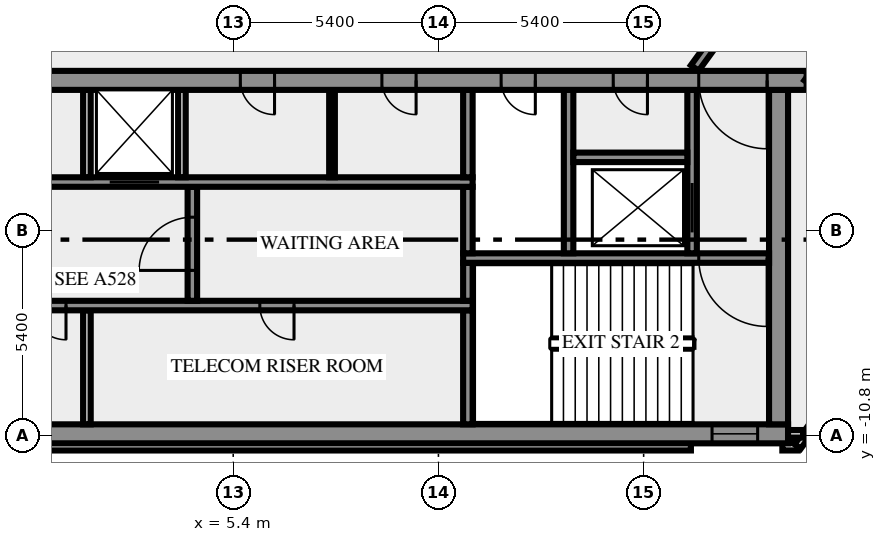
"""IFC4 building model, lengths in metres.
Left out: names, types, materials, properties, quantities, classifications, styles, units other than length and angle.
Written with IfcOpenShell. Run it as: python <this file> out.ifc"""

import sys

from ifc_helpers import new_model, si_unit, direction, frame, frame_2d, origin, place, context, subcontext, project, spatial, rectangle, extrude, element, fill, save


model = new_model("IFC4")
c1 = context("Model", 3, precision=1e-05, world=origin(), true_north=direction((0.0, 1.0)))
c2 = subcontext(c1, "Body", "Model", "MODEL_VIEW")
j1 = project(units=[si_unit("LENGTHUNIT", "METRE"), si_unit("PLANEANGLEUNIT", "RADIAN")], contexts=[c1])
p1 = place(None, origin())
s1 = spatial("IfcSite", under=j1, at=p1, CompositionType="ELEMENT")
p2 = place(p1, origin())
s2 = spatial("IfcBuilding", under=s1, at=p2, CompositionType="ELEMENT")
p3 = place(p2, frame((0.0, 0.0, 351.0)))
s3 = spatial("IfcBuildingStorey", under=s2, at=p3, CompositionType="ELEMENT", Elevation=351.0)
p4 = place(p3, frame((-17.444, -11.088, 0.0), z_axis=(0.0, 0.0, 1.0), x_axis=(1.0, 0.0, 0.0)))
e1 = element("IfcWall", 1, at=p4, inside=s3, PredefinedType="SOLIDWALL", context=c2, shape_type="SweptSolid", body=[
    extrude(rectangle(XDim=34.888, YDim=0.2, at=frame_2d((17.444, 0.0))), origin(), (0.0, 0.0, 1.0), 3.2),
])
p5 = place(p3, frame((19.85, -11.088, 0.0), z_axis=(0.0, 0.0, 1.0), x_axis=(1.0, 0.0, 0.0)))
e2 = element("IfcWall", 2, at=p5, inside=s3, PredefinedType="SOLIDWALL", context=c2, shape_type="SweptSolid", body=[
    extrude(rectangle(XDim=0.406, YDim=0.2, at=frame_2d((0.203, 0.0))), origin(), (0.0, 0.0, 1.0), 3.2),
])
p6 = place(p3, frame((20.253, -11.083, 0.0), z_axis=(0.0, 0.0, 1.0), x_axis=(0.587766567315, 0.809030569476, 0.0)))
e3 = element("IfcWall", 3, at=p6, inside=s3, PredefinedType="SOLIDWALL", context=c2, shape_type="SweptSolid", body=[
    extrude(rectangle(XDim=2.688, YDim=0.2, at=frame_2d((1.344, 0.0))), origin(), (0.0, 0.0, 1.0), 3.2),
])
p7 = place(p3, frame((19.98, -10.75, 0.0), z_axis=(0.0, 0.0, 1.0), x_axis=(1.0, 0.0, 0.0)))
e4 = element("IfcWall", 4, at=p7, inside=s3, PredefinedType="SOLIDWALL", context=c2, shape_type="SweptSolid", body=[
    extrude(rectangle(XDim=0.417, YDim=0.2, at=frame_2d((0.208, 0.0))), origin(), (0.0, 0.0, 1.0), 3.2),
])
p8 = place(p3, frame((-20.0, -10.75, 0.0), z_axis=(0.0, 0.0, 1.0), x_axis=(1.0, 0.0, 0.0)))
e5 = element("IfcWall", 5, at=p8, inside=s3, PredefinedType="SHEAR", context=c2, shape_type="SweptSolid", body=[
    extrude(rectangle(XDim=40.0, YDim=0.5, at=frame_2d((20.0, 0.0))), origin(), (0.0, 0.0, 1.0), 3.2),
])
p9 = place(p8, frame((0.8, 0.0, 1.0)))
e6 = element("IfcOpeningElement", 6, at=p9, cuts=e5, PredefinedType="OPENING", context=c2, shape_type="SweptSolid", body=[
    extrude(rectangle(XDim=1.2, YDim=1.2, at=frame_2d((0.6, 0.6))), frame((0.0, 0.26, 0.0), z_axis=(0.0, -1.0, 0.0), x_axis=(1.0, 0.0, 0.0)), (0.0, 0.0, 1.0), 0.52),
])
p10 = place(p8, frame((38.0, 0.0, 1.0)))
e7 = element("IfcOpeningElement", 7, at=p10, cuts=e5, PredefinedType="OPENING", context=c2, shape_type="SweptSolid", body=[
    extrude(rectangle(XDim=1.2, YDim=1.2, at=frame_2d((0.6, 0.6))), frame((0.0, 0.26, 0.0), z_axis=(0.0, -1.0, 0.0), x_axis=(1.0, 0.0, 0.0)), (0.0, 0.0, 1.0), 0.52),
])
p11 = place(p3, frame((1.55, -10.5, 0.0), z_axis=(0.0, 0.0, 1.0), x_axis=(0.0, 1.0, 0.0)))
e8 = element("IfcWall", 8, at=p11, inside=s3, PredefinedType="SOLIDWALL", context=c2, shape_type="SweptSolid", body=[
    extrude(rectangle(XDim=3.0, YDim=0.2, at=frame_2d((1.5, 0.0))), origin(), (0.0, 0.0, 1.0), 3.2),
])
p12 = place(p3, frame((11.575, -10.5, 0.0), z_axis=(0.0, 0.0, 1.0), x_axis=(0.0, 1.0, 0.0)))
e9 = element("IfcWall", 9, at=p12, inside=s3, PredefinedType="SHEAR", context=c2, shape_type="SweptSolid", body=[
    extrude(rectangle(XDim=3.0, YDim=0.25, at=frame_2d((1.5, 0.0))), origin(), (0.0, 0.0, 1.0), 3.2),
])
p13 = place(p3, frame((19.75, -10.5, 0.0), z_axis=(0.0, 0.0, 1.0), x_axis=(0.0, 1.0, 0.0)))
e10 = element("IfcWall", 10, at=p13, inside=s3, PredefinedType="SHEAR", context=c2, shape_type="SweptSolid", body=[
    extrude(rectangle(XDim=8.8, YDim=0.5, at=frame_2d((4.4, 0.0))), origin(), (0.0, 0.0, 1.0), 3.2),
])
p14 = place(p3, frame((11.7, -7.375, 0.0), z_axis=(0.0, 0.0, 1.0), x_axis=(-1.0, 0.0, 0.0)))
e11 = element("IfcWall", 11, at=p14, inside=s3, PredefinedType="SHEAR", context=c2, shape_type="SweptSolid", body=[
    extrude(rectangle(XDim=23.4, YDim=0.25, at=frame_2d((11.7, 0.0))), origin(), (0.0, 0.0, 1.0), 3.2),
])
p15 = place(p14, frame((22.225, 0.0, 0.0)))
e12 = element("IfcOpeningElement", 12, at=p15, cuts=e11, PredefinedType="OPENING", context=c2, shape_type="SweptSolid", body=[
    extrude(rectangle(XDim=0.8, YDim=2.1, at=frame_2d((0.4, 1.05))), frame((0.0, 0.135, 0.0), z_axis=(0.0, -1.0, 0.0), x_axis=(1.0, 0.0, 0.0)), (0.0, 0.0, 1.0), 0.27),
])
p16 = place(p14, frame((20.2, 0.0, 0.0)))
e13 = element("IfcOpeningElement", 13, at=p16, cuts=e11, PredefinedType="OPENING", context=c2, shape_type="SweptSolid", body=[
    extrude(rectangle(XDim=1.1, YDim=2.1, at=frame_2d((0.55, 1.05))), frame((0.0, 0.135, 0.0), z_axis=(0.0, -1.0, 0.0), x_axis=(1.0, 0.0, 0.0)), (0.0, 0.0, 1.0), 0.27),
])
p17 = place(p14, frame((17.7, 0.0, 0.0)))
e14 = element("IfcOpeningElement", 14, at=p17, cuts=e11, PredefinedType="OPENING", context=c2, shape_type="SweptSolid", body=[
    extrude(rectangle(XDim=1.1, YDim=2.1, at=frame_2d((0.55, 1.05))), frame((0.0, 0.135, 0.0), z_axis=(0.0, -1.0, 0.0), x_axis=(1.0, 0.0, 0.0)), (0.0, 0.0, 1.0), 0.27),
])
p18 = place(p14, frame((15.975, 0.0, 0.0)))
e15 = element("IfcOpeningElement", 15, at=p18, cuts=e11, PredefinedType="OPENING", context=c2, shape_type="SweptSolid", body=[
    extrude(rectangle(XDim=0.8, YDim=2.1, at=frame_2d((0.4, 1.05))), frame((0.0, 0.135, 0.0), z_axis=(0.0, -1.0, 0.0), x_axis=(1.0, 0.0, 0.0)), (0.0, 0.0, 1.0), 0.27),
])
p19 = place(p14, frame((14.65, 0.0, 0.0)))
e16 = element("IfcOpeningElement", 16, at=p19, cuts=e11, PredefinedType="OPENING", context=c2, shape_type="SweptSolid", body=[
    extrude(rectangle(XDim=0.8, YDim=2.1, at=frame_2d((0.4, 1.05))), frame((0.0, 0.135, 0.0), z_axis=(0.0, -1.0, 0.0), x_axis=(1.0, 0.0, 0.0)), (0.0, 0.0, 1.0), 0.27),
])
p20 = place(p14, frame((12.8, 0.0, 0.0)))
e17 = element("IfcOpeningElement", 17, at=p20, cuts=e11, PredefinedType="OPENING", context=c2, shape_type="SweptSolid", body=[
    extrude(rectangle(XDim=0.9, YDim=2.1, at=frame_2d((0.45, 1.05))), frame((0.0, 0.135, 0.0), z_axis=(0.0, -1.0, 0.0), x_axis=(1.0, 0.0, 0.0)), (0.0, 0.0, 1.0), 0.27),
])
p21 = place(p14, frame((10.7, 0.0, 0.0)))
e18 = element("IfcOpeningElement", 18, at=p21, cuts=e11, PredefinedType="OPENING", context=c2, shape_type="SweptSolid", body=[
    extrude(rectangle(XDim=0.9, YDim=2.1, at=frame_2d((0.45, 1.05))), frame((0.0, 0.135, 0.0), z_axis=(0.0, -1.0, 0.0), x_axis=(1.0, 0.0, 0.0)), (0.0, 0.0, 1.0), 0.27),
])
p22 = place(p14, frame((4.7, 0.0, 0.0)))
e19 = element("IfcOpeningElement", 19, at=p22, cuts=e11, PredefinedType="OPENING", context=c2, shape_type="SweptSolid", body=[
    extrude(rectangle(XDim=0.9, YDim=2.1, at=frame_2d((0.45, 1.05))), frame((0.0, 0.135, 0.0), z_axis=(0.0, -1.0, 0.0), x_axis=(1.0, 0.0, 0.0)), (0.0, 0.0, 1.0), 0.27),
])
p23 = place(p3, frame((4.325, -7.25, 0.0), z_axis=(0.0, 0.0, 1.0), x_axis=(0.0, 1.0, 0.0)))
e20 = element("IfcWall", 20, at=p23, inside=s3, PredefinedType="SHEAR", context=c2, shape_type="SweptSolid", body=[
    extrude(rectangle(XDim=3.0, YDim=0.25, at=frame_2d((1.5, 0.0))), origin(), (0.0, 0.0, 1.0), 3.2),
])
p24 = place(p23, frame((0.8, 0.0, 0.0)))
e21 = element("IfcOpeningElement", 21, at=p24, cuts=e20, PredefinedType="OPENING", context=c2, shape_type="SweptSolid", body=[
    extrude(rectangle(XDim=1.4, YDim=2.1, at=frame_2d((0.7, 1.05))), frame((0.0, 0.135, 0.0), z_axis=(0.0, -1.0, 0.0), x_axis=(1.0, 0.0, 0.0)), (0.0, 0.0, 1.0), 0.27),
])
p25 = place(p3, frame((11.575, -7.25, 0.0), z_axis=(0.0, 0.0, 1.0), x_axis=(0.0, 1.0, 0.0)))
e22 = element("IfcWall", 22, at=p25, inside=s3, PredefinedType="SHEAR", context=c2, shape_type="SweptSolid", body=[
    extrude(rectangle(XDim=1.0, YDim=0.25, at=frame_2d((0.5, 0.0))), origin(), (0.0, 0.0, 1.0), 3.2),
])
p26 = place(p3, frame((19.5, -6.125, 0.0), z_axis=(0.0, 0.0, 1.0), x_axis=(-1.0, 0.0, 0.0)))
e23 = element("IfcWall", 23, at=p26, inside=s3, PredefinedType="SHEAR", context=c2, shape_type="SweptSolid", body=[
    extrude(rectangle(XDim=8.05, YDim=0.25, at=frame_2d((4.025, 0.0))), origin(), (0.0, 0.0, 1.0), 3.2),
])
p27 = place(p26, frame((0.05, 0.0, 0.0)))
e24 = element("IfcOpeningElement", 24, at=p27, cuts=e23, PredefinedType="OPENING", context=c2, shape_type="SweptSolid", body=[
    extrude(rectangle(XDim=1.8, YDim=2.1, at=frame_2d((0.9, 1.05))), frame((0.0, 0.135, 0.0), z_axis=(0.0, -1.0, 0.0), x_axis=(1.0, 0.0, 0.0)), (0.0, 0.0, 1.0), 0.27),
])
p28 = place(p3, frame((11.575, -6.0, 0.0), z_axis=(0.0, 0.0, 1.0), x_axis=(0.0, 1.0, 0.0)))
e25 = element("IfcWall", 25, at=p28, inside=s3, PredefinedType="SHEAR", context=c2, shape_type="SweptSolid", body=[
    extrude(rectangle(XDim=1.75, YDim=0.25, at=frame_2d((0.875, 0.0))), origin(), (0.0, 0.0, 1.0), 3.2),
])
p29 = place(p3, frame((14.225, -6.0, 0.0), z_axis=(0.0, 0.0, 1.0), x_axis=(0.0, 1.0, 0.0)))
e26 = element("IfcWall", 26, at=p29, inside=s3, PredefinedType="SHEAR", context=c2, shape_type="SweptSolid", body=[
    extrude(rectangle(XDim=4.3, YDim=0.25, at=frame_2d((2.15, 0.0))), origin(), (0.0, 0.0, 1.0), 3.2),
])
p30 = place(p3, frame((17.475, -6.0, 0.0), z_axis=(0.0, 0.0, 1.0), x_axis=(0.0, 1.0, 0.0)))
e27 = element("IfcWall", 27, at=p30, inside=s3, PredefinedType="SHEAR", context=c2, shape_type="SweptSolid", body=[
    extrude(rectangle(XDim=4.3, YDim=0.25, at=frame_2d((2.15, 0.0))), origin(), (0.0, 0.0, 1.0), 3.2),
])
p31 = place(p30, frame((0.55, 0.0, 0.0)))
e28 = element("IfcOpeningElement", 28, at=p31, cuts=e27, PredefinedType="OPENING", context=c2, shape_type="SweptSolid", body=[
    extrude(rectangle(XDim=1.3, YDim=2.1, at=frame_2d((0.65, 1.05))), frame((0.0, 0.135, 0.0), z_axis=(0.0, -1.0, 0.0), x_axis=(1.0, 0.0, 0.0)), (0.0, 0.0, 1.0), 0.27),
])
p32 = place(p3, frame((-0.6, -4.125, 0.0), z_axis=(0.0, 0.0, 1.0), x_axis=(1.0, 0.0, 0.0)))
e29 = element("IfcWall", 29, at=p32, inside=s3, PredefinedType="SHEAR", context=c2, shape_type="SweptSolid", body=[
    extrude(rectangle(XDim=12.3, YDim=0.25, at=frame_2d((6.15, 0.0))), origin(), (0.0, 0.0, 1.0), 3.2),
])
p33 = place(p32, frame((2.75, 0.0, 0.0)))
e30 = element("IfcOpeningElement", 30, at=p33, cuts=e29, PredefinedType="OPENING", context=c2, shape_type="SweptSolid", body=[
    extrude(rectangle(XDim=1.3, YDim=2.1, at=frame_2d((0.65, 1.05))), frame((0.0, 0.135, 0.0), z_axis=(0.0, -1.0, 0.0), x_axis=(1.0, 0.0, 0.0)), (0.0, 0.0, 1.0), 0.27),
])
for number, where, z_axis, x_axis in (
    (31, (1.55, -4.0, 0.0), (0.0, 0.0, 1.0), (0.0, 1.0, 0.0)),
    (32, (4.05, -4.0, 0.0), (0.0, 0.0, 1.0), (0.0, 1.0, 0.0)),
):
    element("IfcWall", number, at=place(p3, frame(where, z_axis=z_axis, x_axis=x_axis)), inside=s3, PredefinedType="SOLIDWALL", context=c2, shape_type="SweptSolid", body=[
        extrude(rectangle(XDim=2.3, YDim=0.2, at=frame_2d((1.15, 0.0))), origin(), (0.0, 0.0, 1.0), 3.2),
    ])
p34 = place(p3, frame((8.0, -4.0, 0.0), z_axis=(0.0, 0.0, 1.0), x_axis=(0.0, 1.0, 0.0)))
e33 = element("IfcWall", 33, at=p34, inside=s3, PredefinedType="PARTITIONING", context=c2, shape_type="SweptSolid", body=[
    extrude(rectangle(XDim=2.3, YDim=0.15, at=frame_2d((1.15, 0.0))), origin(), (0.0, 0.0, 1.0), 3.2),
])
p35 = place(p3, frame((11.575, -4.0, 0.0), z_axis=(0.0, 0.0, 1.0), x_axis=(0.0, 1.0, 0.0)))
e34 = element("IfcWall", 34, at=p35, inside=s3, PredefinedType="SHEAR", context=c2, shape_type="SweptSolid", body=[
    extrude(rectangle(XDim=2.3, YDim=0.25, at=frame_2d((1.15, 0.0))), origin(), (0.0, 0.0, 1.0), 3.2),
])
p36 = place(p3, frame((14.35, -3.475, 0.0), z_axis=(0.0, 0.0, 1.0), x_axis=(1.0, 0.0, 0.0)))
e35 = element("IfcWall", 35, at=p36, inside=s3, PredefinedType="SHEAR", context=c2, shape_type="SweptSolid", body=[
    extrude(rectangle(XDim=3.0, YDim=0.25, at=frame_2d((1.5, 0.0))), origin(), (0.0, 0.0, 1.0), 3.2),
])
p37 = place(p3, frame((20.49, -1.45, 0.0), z_axis=(0.0, 0.0, 1.0), x_axis=(-1.0, 0.0, 0.0)))
e36 = element("IfcWall", 36, at=p37, inside=s3, PredefinedType="SHEAR", context=c2, shape_type="SweptSolid", body=[
    extrude(rectangle(XDim=40.98, YDim=0.5, at=frame_2d((20.49, 0.0))), origin(), (0.0, 0.0, 1.0), 3.2),
])
p38 = place(p37, frame((38.14, 0.0, 0.0)))
e37 = element("IfcOpeningElement", 37, at=p38, cuts=e36, PredefinedType="OPENING", context=c2, shape_type="SweptSolid", body=[
    extrude(rectangle(XDim=1.8, YDim=2.1, at=frame_2d((0.9, 1.05))), frame((0.0, 0.26, 0.0), z_axis=(0.0, -1.0, 0.0), x_axis=(1.0, 0.0, 0.0)), (0.0, 0.0, 1.0), 0.52),
])
p39 = place(p37, frame((36.728, 0.0, 0.0)))
e38 = element("IfcOpeningElement", 38, at=p39, cuts=e36, PredefinedType="OPENING", context=c2, shape_type="SweptSolid", body=[
    extrude(rectangle(XDim=0.8, YDim=2.1, at=frame_2d((0.4, 1.05))), frame((0.0, 0.26, 0.0), z_axis=(0.0, -1.0, 0.0), x_axis=(1.0, 0.0, 0.0)), (0.0, 0.0, 1.0), 0.52),
])
p40 = place(p37, frame((35.153, 0.0, 0.0)))
e39 = element("IfcOpeningElement", 39, at=p40, cuts=e36, PredefinedType="OPENING", context=c2, shape_type="SweptSolid", body=[
    extrude(rectangle(XDim=0.8, YDim=2.1, at=frame_2d((0.4, 1.05))), frame((0.0, 0.26, 0.0), z_axis=(0.0, -1.0, 0.0), x_axis=(1.0, 0.0, 0.0)), (0.0, 0.0, 1.0), 0.52),
])
p41 = place(p37, frame((32.94, 0.0, 0.0)))
e40 = element("IfcOpeningElement", 40, at=p41, cuts=e36, PredefinedType="OPENING", context=c2, shape_type="SweptSolid", body=[
    extrude(rectangle(XDim=0.9, YDim=2.1, at=frame_2d((0.45, 1.05))), frame((0.0, 0.26, 0.0), z_axis=(0.0, -1.0, 0.0), x_axis=(1.0, 0.0, 0.0)), (0.0, 0.0, 1.0), 0.52),
])
p42 = place(p37, frame((31.015, 0.0, 0.0)))
e41 = element("IfcOpeningElement", 41, at=p42, cuts=e36, PredefinedType="OPENING", context=c2, shape_type="SweptSolid", body=[
    extrude(rectangle(XDim=0.8, YDim=2.1, at=frame_2d((0.4, 1.05))), frame((0.0, 0.26, 0.0), z_axis=(0.0, -1.0, 0.0), x_axis=(1.0, 0.0, 0.0)), (0.0, 0.0, 1.0), 0.52),
])
p43 = place(p37, frame((24.765, 0.0, 0.0)))
e42 = element("IfcOpeningElement", 42, at=p43, cuts=e36, PredefinedType="OPENING", context=c2, shape_type="SweptSolid", body=[
    extrude(rectangle(XDim=0.8, YDim=2.1, at=frame_2d((0.4, 1.05))), frame((0.0, 0.26, 0.0), z_axis=(0.0, -1.0, 0.0), x_axis=(1.0, 0.0, 0.0)), (0.0, 0.0, 1.0), 0.52),
])
p44 = place(p37, frame((21.765, 0.0, 0.0)))
e43 = element("IfcOpeningElement", 43, at=p44, cuts=e36, PredefinedType="OPENING", context=c2, shape_type="SweptSolid", body=[
    extrude(rectangle(XDim=2.0, YDim=2.1, at=frame_2d((1.0, 1.05))), frame((0.0, 0.26, 0.0), z_axis=(0.0, -1.0, 0.0), x_axis=(1.0, 0.0, 0.0)), (0.0, 0.0, 1.0), 0.52),
])
p45 = place(p37, frame((14.002, 0.0, 0.0)))
e44 = element("IfcOpeningElement", 44, at=p45, cuts=e36, PredefinedType="OPENING", context=c2, shape_type="SweptSolid", body=[
    extrude(rectangle(XDim=0.9, YDim=2.1, at=frame_2d((0.45, 1.05))), frame((0.0, 0.26, 0.0), z_axis=(0.0, -1.0, 0.0), x_axis=(1.0, 0.0, 0.0)), (0.0, 0.0, 1.0), 0.52),
])
p46 = place(p37, frame((10.278, 0.0, 0.0)))
e45 = element("IfcOpeningElement", 45, at=p46, cuts=e36, PredefinedType="OPENING", context=c2, shape_type="SweptSolid", body=[
    extrude(rectangle(XDim=0.9, YDim=2.1, at=frame_2d((0.45, 1.05))), frame((0.0, 0.26, 0.0), z_axis=(0.0, -1.0, 0.0), x_axis=(1.0, 0.0, 0.0)), (0.0, 0.0, 1.0), 0.52),
])
p47 = place(p37, frame((7.14, 0.0, 0.0)))
e46 = element("IfcOpeningElement", 46, at=p47, cuts=e36, PredefinedType="OPENING", context=c2, shape_type="SweptSolid", body=[
    extrude(rectangle(XDim=0.9, YDim=2.1, at=frame_2d((0.45, 1.05))), frame((0.0, 0.26, 0.0), z_axis=(0.0, -1.0, 0.0), x_axis=(1.0, 0.0, 0.0)), (0.0, 0.0, 1.0), 0.52),
])
p48 = place(p37, frame((4.19, 0.0, 0.0)))
e47 = element("IfcOpeningElement", 47, at=p48, cuts=e36, PredefinedType="OPENING", context=c2, shape_type="SweptSolid", body=[
    extrude(rectangle(XDim=0.9, YDim=2.1, at=frame_2d((0.45, 1.05))), frame((0.0, 0.26, 0.0), z_axis=(0.0, -1.0, 0.0), x_axis=(1.0, 0.0, 0.0)), (0.0, 0.0, 1.0), 0.52),
])
p49 = place(p37, frame((1.04, 0.0, 0.0)))
e48 = element("IfcOpeningElement", 48, at=p49, cuts=e36, PredefinedType="OPENING", context=c2, shape_type="SweptSolid", body=[
    extrude(rectangle(XDim=1.8, YDim=2.1, at=frame_2d((0.9, 1.05))), frame((0.0, 0.26, 0.0), z_axis=(0.0, -1.0, 0.0), x_axis=(1.0, 0.0, 0.0)), (0.0, 0.0, 1.0), 0.52),
])
p50 = place(p3, frame((17.545, -1.125, 0.0), z_axis=(0.0, 0.0, 1.0), x_axis=(0.58779555165, 0.809009511354, 0.0)))
e49 = element("IfcWall", 49, at=p50, inside=s3, PredefinedType="SOLIDWALL", context=c2, shape_type="SweptSolid", body=[
    extrude(rectangle(XDim=18.103, YDim=0.25, at=frame_2d((9.052, 0.0))), origin(), (0.0, 0.0, 1.0), 3.2),
])
p51 = place(p50, frame((16.728, 0.0, 0.0)))
e50 = element("IfcOpeningElement", 50, at=p51, cuts=e49, PredefinedType="OPENING", context=c2, shape_type="SweptSolid", body=[
    extrude(rectangle(XDim=0.9, YDim=2.1, at=frame_2d((0.45, 1.05))), frame((0.0, 0.135, 0.0), z_axis=(0.0, -1.0, 0.0), x_axis=(1.0, 0.0, 0.0)), (0.0, 0.0, 1.0), 0.27),
])
p52 = place(p3, frame((30.183, 11.761, 0.0), z_axis=(0.0, 0.0, 1.0), x_axis=(-0.587781762867, -0.80901952958, 0.0)))
e51 = element("IfcWall", 51, at=p52, inside=s3, PredefinedType="SOLIDWALL", context=c2, shape_type="SweptSolid", body=[
    extrude(rectangle(XDim=16.42, YDim=0.25, at=frame_2d((8.21, 0.0))), origin(), (0.0, 0.0, 1.0), 3.2),
])
p53 = place(p52, frame((0.225, 0.0, 0.0)))
e52 = element("IfcOpeningElement", 52, at=p53, cuts=e51, PredefinedType="OPENING", context=c2, shape_type="SweptSolid", body=[
    extrude(rectangle(XDim=0.9, YDim=2.1, at=frame_2d((0.45, 1.05))), frame((0.0, 0.135, 0.0), z_axis=(0.0, -1.0, 0.0), x_axis=(1.0, 0.0, 0.0)), (0.0, 0.0, 1.0), 0.27),
])
p54 = place(p52, frame((6.605, 0.0, 0.0)))
e53 = element("IfcOpeningElement", 53, at=p54, cuts=e51, PredefinedType="OPENING", context=c2, shape_type="SweptSolid", body=[
    extrude(rectangle(XDim=0.9, YDim=2.1, at=frame_2d((0.45, 1.05))), frame((0.0, 0.135, 0.0), z_axis=(0.0, -1.0, 0.0), x_axis=(1.0, 0.0, 0.0)), (0.0, 0.0, 1.0), 0.27),
])
p55 = place(p10, origin())
e54 = element("IfcWindow", 54, at=p55, inside=s3, PartitioningType="SINGLE_PANEL", PredefinedType="WINDOW", context=c2, shape_type="SweptSolid", body=[
    extrude(rectangle(XDim=1.2, YDim=1.2, at=frame_2d((0.6, 0.6))), frame((0.0, 0.03, 0.0), z_axis=(0.0, -1.0, 0.0), x_axis=(1.0, 0.0, 0.0)), (0.0, 0.0, 1.0), 0.06),
])
fill(e7, e54)
p56 = place(p21, origin())
e55 = element("IfcDoor", 55, at=p56, inside=s3, OperationType="SINGLE_SWING_LEFT", PredefinedType="DOOR", context=c2, shape_type="SweptSolid", body=[
    extrude(rectangle(XDim=0.9, YDim=2.1, at=frame_2d((0.45, 1.05))), frame((0.0, 0.025, 0.0), z_axis=(0.0, -1.0, 0.0), x_axis=(1.0, 0.0, 0.0)), (0.0, 0.0, 1.0), 0.05),
])
fill(e18, e55)
p57 = place(p22, origin())
e56 = element("IfcDoor", 56, at=p57, inside=s3, OperationType="SINGLE_SWING_LEFT", PredefinedType="DOOR", context=c2, shape_type="SweptSolid", body=[
    extrude(rectangle(XDim=0.9, YDim=2.1, at=frame_2d((0.45, 1.05))), frame((0.0, 0.025, 0.0), z_axis=(0.0, -1.0, 0.0), x_axis=(1.0, 0.0, 0.0)), (0.0, 0.0, 1.0), 0.05),
])
fill(e19, e56)
p58 = place(p24, origin())
e57 = element("IfcDoor", 57, at=p58, inside=s3, OperationType="DOUBLE_DOOR_SINGLE_SWING", PredefinedType="DOOR", context=c2, shape_type="SweptSolid", body=[
    extrude(rectangle(XDim=1.4, YDim=2.1, at=frame_2d((0.7, 1.05))), frame((0.0, 0.025, 0.0), z_axis=(0.0, -1.0, 0.0), x_axis=(1.0, 0.0, 0.0)), (0.0, 0.0, 1.0), 0.05),
])
fill(e21, e57)
p59 = place(p27, origin())
e58 = element("IfcDoor", 58, at=p59, inside=s3, OperationType="DOUBLE_DOOR_SINGLE_SWING", PredefinedType="DOOR", context=c2, shape_type="SweptSolid", body=[
    extrude(rectangle(XDim=1.8, YDim=2.1, at=frame_2d((0.9, 1.05))), frame((0.0, 0.025, 0.0), z_axis=(0.0, -1.0, 0.0), x_axis=(1.0, 0.0, 0.0)), (0.0, 0.0, 1.0), 0.05),
])
fill(e24, e58)
p60 = place(p31, origin())
e59 = element("IfcDoor", 59, at=p60, inside=s3, OperationType="DOUBLE_DOOR_SLIDING", PredefinedType="DOOR", context=c2, shape_type="SweptSolid", body=[
    extrude(rectangle(XDim=1.3, YDim=2.1, at=frame_2d((0.65, 1.05))), frame((0.0, 0.025, 0.0), z_axis=(0.0, -1.0, 0.0), x_axis=(1.0, 0.0, 0.0)), (0.0, 0.0, 1.0), 0.05),
])
fill(e28, e59)
p61 = place(p33, origin())
e60 = element("IfcDoor", 60, at=p61, inside=s3, OperationType="DOUBLE_DOOR_SLIDING", PredefinedType="DOOR", context=c2, shape_type="SweptSolid", body=[
    extrude(rectangle(XDim=1.3, YDim=2.1, at=frame_2d((0.65, 1.05))), frame((0.0, 0.025, 0.0), z_axis=(0.0, -1.0, 0.0), x_axis=(1.0, 0.0, 0.0)), (0.0, 0.0, 1.0), 0.05),
])
fill(e30, e60)
p62 = place(p45, origin())
e61 = element("IfcDoor", 61, at=p62, inside=s3, OperationType="SINGLE_SWING_LEFT", PredefinedType="DOOR", context=c2, shape_type="SweptSolid", body=[
    extrude(rectangle(XDim=0.9, YDim=2.1, at=frame_2d((0.45, 1.05))), frame((0.0, 0.025, 0.0), z_axis=(0.0, -1.0, 0.0), x_axis=(1.0, 0.0, 0.0)), (0.0, 0.0, 1.0), 0.05),
])
fill(e44, e61)
p63 = place(p46, origin())
e62 = element("IfcDoor", 62, at=p63, inside=s3, OperationType="SINGLE_SWING_LEFT", PredefinedType="DOOR", context=c2, shape_type="SweptSolid", body=[
    extrude(rectangle(XDim=0.9, YDim=2.1, at=frame_2d((0.45, 1.05))), frame((0.0, 0.025, 0.0), z_axis=(0.0, -1.0, 0.0), x_axis=(1.0, 0.0, 0.0)), (0.0, 0.0, 1.0), 0.05),
])
fill(e45, e62)
p64 = place(p47, origin())
e63 = element("IfcDoor", 63, at=p64, inside=s3, OperationType="SINGLE_SWING_LEFT", PredefinedType="DOOR", context=c2, shape_type="SweptSolid", body=[
    extrude(rectangle(XDim=0.9, YDim=2.1, at=frame_2d((0.45, 1.05))), frame((0.0, 0.025, 0.0), z_axis=(0.0, -1.0, 0.0), x_axis=(1.0, 0.0, 0.0)), (0.0, 0.0, 1.0), 0.05),
])
fill(e46, e63)
p65 = place(p48, origin())
e64 = element("IfcDoor", 64, at=p65, inside=s3, OperationType="SINGLE_SWING_LEFT", PredefinedType="DOOR", context=c2, shape_type="SweptSolid", body=[
    extrude(rectangle(XDim=0.9, YDim=2.1, at=frame_2d((0.45, 1.05))), frame((0.0, 0.025, 0.0), z_axis=(0.0, -1.0, 0.0), x_axis=(1.0, 0.0, 0.0)), (0.0, 0.0, 1.0), 0.05),
])
fill(e47, e64)
p66 = place(p49, origin())
e65 = element("IfcDoor", 65, at=p66, inside=s3, OperationType="DOUBLE_DOOR_SINGLE_SWING", PredefinedType="DOOR", context=c2, shape_type="SweptSolid", body=[
    extrude(rectangle(XDim=1.8, YDim=2.1, at=frame_2d((0.9, 1.05))), frame((0.0, 0.025, 0.0), z_axis=(0.0, -1.0, 0.0), x_axis=(1.0, 0.0, 0.0)), (0.0, 0.0, 1.0), 0.05),
])
fill(e48, e65)
save(model, sys.argv[1])
